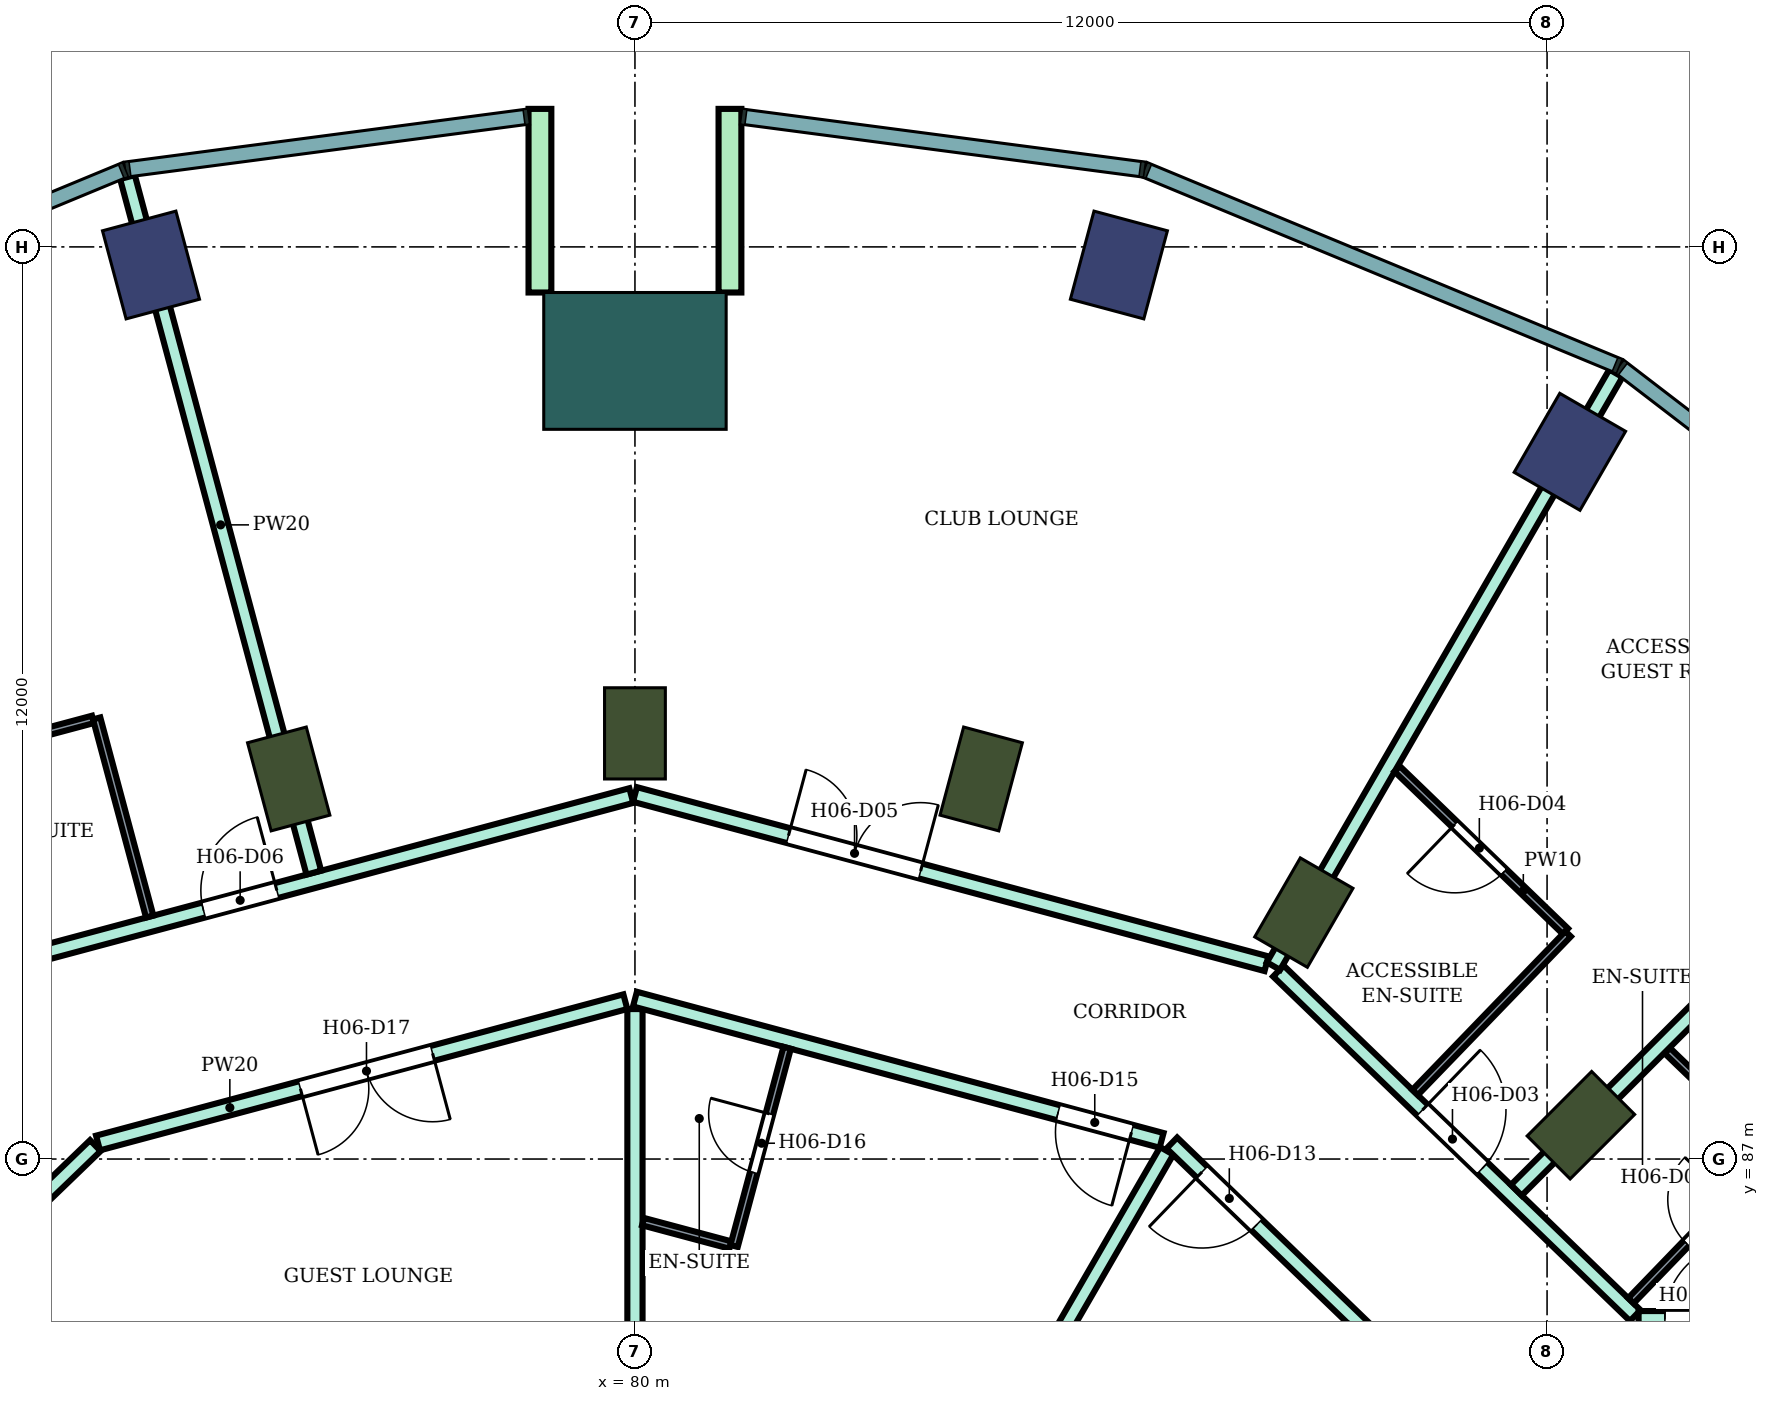
"""IFC4 building model, lengths in metres.
Left out: names, types, materials, properties, quantities, classifications, styles, units other than length and angle.
Written with IfcOpenShell. Run it as: python <this file> out.ifc"""

import sys

from ifc_helpers import new_model, si_unit, direction, frame, frame_2d, origin, origin_2d, place, context, subcontext, project, spatial, rectangle, extrude, element, fill, save


model = new_model("IFC4")
c1 = context("Model", 3, precision=1e-05, world=origin(), true_north=direction((0.0, 1.0)))
c2 = subcontext(c1, "Body", "Model", "MODEL_VIEW")
j1 = project(units=[si_unit("LENGTHUNIT", "METRE"), si_unit("PLANEANGLEUNIT", "RADIAN")], contexts=[c1])
p1 = place(None, origin())
s1 = spatial("IfcSite", under=j1, at=p1, CompositionType="ELEMENT")
p2 = place(p1, origin())
s2 = spatial("IfcBuilding", under=s1, at=p2, CompositionType="ELEMENT")
p3 = place(p2, frame((0.0, 0.0, 93.8)))
s3 = spatial("IfcBuildingStorey", under=s2, at=p3, CompositionType="ELEMENT", Elevation=93.8)
for number, where, z_axis, x_axis in (
    (1, (92.3, 96.304, 0.0), (0.0, 0.0, 1.0), (0.5, 0.866, 0.0)),
    (2, (86.367, 98.762, 0.0), (0.0, 0.0, 1.0), (0.259, 0.966, 0.0)),
    (3, (73.633, 98.762, 0.0), (0.0, 0.0, 1.0), (-0.259, 0.966, 0.0)),
):
    element("IfcColumn", number, at=place(p3, frame(where, z_axis=z_axis, x_axis=x_axis)), inside=s3, PredefinedType="COLUMN", context=c2, shape_type="SweptSolid", body=[
        extrude(rectangle(XDim=1.2, YDim=1.0, at=origin_2d()), origin(), (0.0, 0.0, 1.0), 3.8),
    ])
for number, where, z_axis, x_axis in (
    (4, (92.445, 87.445, 0.0), (0.0, 0.0, 1.0), (0.707, 0.707, 0.0)),
    (5, (88.8, 90.242, 0.0), (0.0, 0.0, 1.0), (0.5, 0.866, 0.0)),
    (6, (84.555, 92.0, 0.0), (0.0, 0.0, 1.0), (0.259, 0.966, 0.0)),
    (7, (80.0, 92.6, 0.0), (0.0, 0.0, 1.0), (0.0, 1.0, 0.0)),
    (8, (75.445, 92.0, 0.0), (0.0, 0.0, 1.0), (-0.259, 0.966, 0.0)),
):
    element("IfcColumn", number, at=place(p3, frame(where, z_axis=z_axis, x_axis=x_axis)), inside=s3, PredefinedType="COLUMN", context=c2, shape_type="SweptSolid", body=[
        extrude(rectangle(XDim=1.2, YDim=0.8, at=origin_2d()), origin(), (0.0, 0.0, 1.0), 3.8),
    ])
p4 = place(p3, frame((80.0, 97.5, 0.0), z_axis=(0.0, 0.0, 1.0), x_axis=(0.0, 1.0, 0.0)))
e9 = element("IfcColumn", 9, at=p4, inside=s3, PredefinedType="COLUMN", context=c2, shape_type="SweptSolid", body=[
    extrude(rectangle(XDim=1.8, YDim=2.4, at=origin_2d()), origin(), (0.0, 0.0, 1.0), 3.8),
])
for number, where, z_axis, x_axis in (
    (10, (81.25, 98.4, 0.0), (0.0, 0.0, 1.0), (0.0, 1.0, 0.0)),
    (11, (78.75, 98.4, 0.0), (0.0, 0.0, 1.0), (0.0, 1.0, 0.0)),
):
    element("IfcWall", number, at=place(p3, frame(where, z_axis=z_axis, x_axis=x_axis)), inside=s3, PredefinedType="NOTDEFINED", context=c2, shape_type="SweptSolid", body=[
        extrude(rectangle(XDim=2.416, YDim=0.3, at=frame_2d((1.208, 0.0))), origin(), (0.0, 0.0, 1.0), 3.8),
    ])
p5 = place(p3, frame((68.987, 83.4, 0.0), z_axis=(0.0, 0.0, 1.0), x_axis=(0.719586298962, 0.694403022997, 0.0)))
e12 = element("IfcWall", 12, at=p5, inside=s3, PredefinedType="PARTITIONING", context=c2, shape_type="SweptSolid", body=[
    extrude(rectangle(XDim=5.439, YDim=0.2, at=frame_2d((2.719, 0.0))), origin(), (0.0, 0.0, 1.0), 3.35),
])
p6 = place(p3, frame((71.614, 89.55, 0.0), z_axis=(0.0, 0.0, 1.0), x_axis=(0.965982378603, 0.258607896685, 0.0)))
e13 = element("IfcWall", 13, at=p6, inside=s3, PredefinedType="PARTITIONING", context=c2, shape_type="SweptSolid", body=[
    extrude(rectangle(XDim=8.632, YDim=0.2, at=frame_2d((4.316, 0.0))), origin(), (0.0, 0.0, 1.0), 3.35),
])
p7 = place(p6, frame((2.804, 0.0, 0.0)))
e14 = element("IfcOpeningElement", 14, at=p7, cuts=e13, PredefinedType="OPENING", context=c2, shape_type="SweptSolid", body=[
    extrude(rectangle(XDim=1.0, YDim=2.1, at=frame_2d((0.5, 1.05))), frame((0.0, 0.11, 0.0), z_axis=(0.0, -1.0, 0.0), x_axis=(1.0, 0.0, 0.0)), (0.0, 0.0, 1.0), 0.22),
])
p8 = place(p3, frame((72.936, 87.211, 0.0), z_axis=(0.0, 0.0, 1.0), x_axis=(0.965917703859, 0.258849356521, 0.0)))
e15 = element("IfcWall", 15, at=p8, inside=s3, PredefinedType="PARTITIONING", context=c2, shape_type="SweptSolid", body=[
    extrude(rectangle(XDim=7.182, YDim=0.2, at=frame_2d((3.591, 0.0))), origin(), (0.0, 0.0, 1.0), 3.35),
])
p9 = place(p8, frame((2.757, 0.0, 0.0)))
e16 = element("IfcOpeningElement", 16, at=p9, cuts=e15, PredefinedType="OPENING", context=c2, shape_type="SweptSolid", body=[
    extrude(rectangle(XDim=1.8, YDim=2.1, at=frame_2d((0.9, 1.05))), frame((0.0, 0.11, 0.0), z_axis=(0.0, -1.0, 0.0), x_axis=(1.0, 0.0, 0.0)), (0.0, 0.0, 1.0), 0.22),
])
p10 = place(p3, frame((73.323, 99.918, 0.0), z_axis=(0.0, 0.0, 1.0), x_axis=(0.258812513968, -0.965927576278, 0.0)))
e17 = element("IfcWall", 17, at=p10, inside=s3, PredefinedType="PARTITIONING", context=c2, shape_type="SweptSolid", body=[
    extrude(rectangle(XDim=9.474, YDim=0.2, at=frame_2d((4.737, 0.0))), origin(), (0.0, 0.0, 1.0), 3.35),
])
p11 = place(p3, frame((80.0, 82.7, 0.0), z_axis=(0.0, 0.0, 1.0), x_axis=(0.0, 1.0, 0.0)))
e18 = element("IfcWall", 18, at=p11, inside=s3, PredefinedType="PARTITIONING", context=c2, shape_type="SweptSolid", body=[
    extrude(rectangle(XDim=6.273, YDim=0.2, at=frame_2d((3.136, 0.0))), origin(), (0.0, 0.0, 1.0), 3.35),
])
p12 = place(p3, frame((80.0, 89.104, 0.0), z_axis=(0.0, 0.0, 1.0), x_axis=(0.965856548257, -0.259077455964, 0.0)))
e19 = element("IfcWall", 19, at=p12, inside=s3, PredefinedType="PARTITIONING", context=c2, shape_type="SweptSolid", body=[
    extrude(rectangle(XDim=7.173, YDim=0.2, at=frame_2d((3.586, 0.0))), origin(), (0.0, 0.0, 1.0), 3.35),
])
p13 = place(p12, frame((5.763, 0.0, 0.0)))
e20 = element("IfcOpeningElement", 20, at=p13, cuts=e19, PredefinedType="OPENING", context=c2, shape_type="SweptSolid", body=[
    extrude(rectangle(XDim=1.0, YDim=2.1, at=frame_2d((0.5, 1.05))), frame((0.0, 0.11, 0.0), z_axis=(0.0, -1.0, 0.0), x_axis=(1.0, 0.0, 0.0)), (0.0, 0.0, 1.0), 0.22),
])
p14 = place(p3, frame((80.0, 91.796, 0.0), z_axis=(0.0, 0.0, 1.0), x_axis=(0.965917643923, -0.258849580177, 0.0)))
e21 = element("IfcWall", 21, at=p14, inside=s3, PredefinedType="PARTITIONING", context=c2, shape_type="SweptSolid", body=[
    extrude(rectangle(XDim=8.602, YDim=0.2, at=frame_2d((4.301, 0.0))), origin(), (0.0, 0.0, 1.0), 3.35),
])
p15 = place(p14, frame((2.091, 0.0, 0.0)))
e22 = element("IfcOpeningElement", 22, at=p15, cuts=e21, PredefinedType="OPENING", context=c2, shape_type="SweptSolid", body=[
    extrude(rectangle(XDim=1.8, YDim=2.1, at=frame_2d((0.9, 1.05))), frame((0.0, 0.11, 0.0), z_axis=(0.0, -1.0, 0.0), x_axis=(1.0, 0.0, 0.0)), (0.0, 0.0, 1.0), 0.22),
])
p16 = place(p3, frame((83.852, 81.665, 0.0), z_axis=(0.0, 0.0, 1.0), x_axis=(0.500236829077, 0.86588862727, 0.0)))
e23 = element("IfcWall", 23, at=p16, inside=s3, PredefinedType="PARTITIONING", context=c2, shape_type="SweptSolid", body=[
    extrude(rectangle(XDim=6.286, YDim=0.2, at=frame_2d((3.143, 0.0))), origin(), (0.0, 0.0, 1.0), 3.35),
])
p17 = place(p3, frame((87.064, 87.211, 0.0), z_axis=(0.0, 0.0, 1.0), x_axis=(0.719540958932, -0.694450004262, 0.0)))
e24 = element("IfcWall", 24, at=p17, inside=s3, PredefinedType="PARTITIONING", context=c2, shape_type="SweptSolid", body=[
    extrude(rectangle(XDim=5.488, YDim=0.2, at=frame_2d((2.744, 0.0))), origin(), (0.0, 0.0, 1.0), 3.35),
])
p18 = place(p17, frame((0.55, 0.0, 0.0)))
e25 = element("IfcOpeningElement", 25, at=p18, cuts=e24, PredefinedType="OPENING", context=c2, shape_type="SweptSolid", body=[
    extrude(rectangle(XDim=1.0, YDim=2.1, at=frame_2d((0.5, 1.05))), frame((0.0, 0.11, 0.0), z_axis=(0.0, -1.0, 0.0), x_axis=(1.0, 0.0, 0.0)), (0.0, 0.0, 1.0), 0.22),
])
p19 = place(p3, frame((88.465, 89.473, 0.0), z_axis=(0.0, 0.0, 1.0), x_axis=(0.719474304909, -0.694519059908, 0.0)))
e26 = element("IfcWall", 26, at=p19, inside=s3, PredefinedType="PARTITIONING", context=c2, shape_type="SweptSolid", body=[
    extrude(rectangle(XDim=6.525, YDim=0.2, at=frame_2d((3.263, 0.0))), origin(), (0.0, 0.0, 1.0), 3.35),
])
p20 = place(p19, frame((2.633, 0.0, 0.0)))
e27 = element("IfcOpeningElement", 27, at=p20, cuts=e26, PredefinedType="OPENING", context=c2, shape_type="SweptSolid", body=[
    extrude(rectangle(XDim=1.1, YDim=2.1, at=frame_2d((0.55, 1.05))), frame((0.0, 0.11, 0.0), z_axis=(0.0, -1.0, 0.0), x_axis=(1.0, 0.0, 0.0)), (0.0, 0.0, 1.0), 0.22),
])
p21 = place(p3, frame((88.4, 89.538, 0.0), z_axis=(0.0, 0.0, 1.0), x_axis=(0.500234695877, 0.865889859648, 0.0)))
e28 = element("IfcWall", 28, at=p21, inside=s3, PredefinedType="PARTITIONING", context=c2, shape_type="SweptSolid", body=[
    extrude(rectangle(XDim=9.007, YDim=0.2, at=frame_2d((4.503, 0.0))), origin(), (0.0, 0.0, 1.0), 3.35),
])
p22 = place(p3, frame((91.595, 86.59, 0.0), z_axis=(0.0, 0.0, 1.0), x_axis=(0.707232337591, 0.706981202484, 0.0)))
e29 = element("IfcWall", 29, at=p22, inside=s3, PredefinedType="PARTITIONING", context=c2, shape_type="SweptSolid", body=[
    extrude(rectangle(XDim=6.805, YDim=0.2, at=frame_2d((3.402, 0.0))), origin(), (0.0, 0.0, 1.0), 3.35),
])
p23 = place(p3, frame((93.204, 84.9, 0.0), z_axis=(0.0, 0.0, 1.0), x_axis=(1.0, 0.0, 0.0)))
e30 = element("IfcWall", 30, at=p23, inside=s3, PredefinedType="PARTITIONING", context=c2, shape_type="SweptSolid", body=[
    extrude(rectangle(XDim=1.496, YDim=0.2, at=frame_2d((0.748, 0.0))), origin(), (0.0, 0.0, 1.0), 3.35),
])
p24 = place(p23, frame((0.346, 0.0, 0.0)))
e31 = element("IfcOpeningElement", 31, at=p24, cuts=e30, PredefinedType="OPENING", context=c2, shape_type="SweptSolid", body=[
    extrude(rectangle(XDim=1.0, YDim=2.1, at=frame_2d((0.5, 1.05))), frame((0.0, 0.11, 0.0), z_axis=(0.0, -1.0, 0.0), x_axis=(1.0, 0.0, 0.0)), (0.0, 0.0, 1.0), 0.22),
])
p25 = place(p3, frame((70.268, 92.087, 0.0), z_axis=(0.0, 0.0, 1.0), x_axis=(0.965937937835, 0.258773839966, 0.0)))
e32 = element("IfcWall", 32, at=p25, inside=s3, PredefinedType="PARTITIONING", context=c2, shape_type="SweptSolid", body=[
    extrude(rectangle(XDim=2.694, YDim=0.1, at=frame_2d((1.347, 0.0))), origin(), (0.0, 0.0, 1.0), 3.35),
])
p26 = place(p25, frame((0.912, 0.0, 0.0)))
e33 = element("IfcOpeningElement", 33, at=p26, cuts=e32, PredefinedType="OPENING", context=c2, shape_type="SweptSolid", body=[
    extrude(rectangle(XDim=0.8, YDim=2.1, at=frame_2d((0.4, 1.05))), frame((0.0, 0.06, 0.0), z_axis=(0.0, -1.0, 0.0), x_axis=(1.0, 0.0, 0.0)), (0.0, 0.0, 1.0), 0.12),
])
p27 = place(p3, frame((72.918, 92.797, 0.0), z_axis=(0.0, 0.0, 1.0), x_axis=(0.25867580527, -0.965964195904, 0.0)))
e34 = element("IfcWall", 34, at=p27, inside=s3, PredefinedType="PARTITIONING", context=c2, shape_type="SweptSolid", body=[
    extrude(rectangle(XDim=2.699, YDim=0.1, at=frame_2d((1.35, 0.0))), origin(), (0.0, 0.0, 1.0), 3.35),
])
p28 = place(p3, frame((80.106, 86.177, 0.0), z_axis=(0.0, 0.0, 1.0), x_axis=(0.966002973184, -0.258530957139, 0.0)))
e35 = element("IfcWall", 35, at=p28, inside=s3, PredefinedType="PARTITIONING", context=c2, shape_type="SweptSolid", body=[
    extrude(rectangle(XDim=1.19, YDim=0.1, at=frame_2d((0.595, 0.0))), origin(), (0.0, 0.0, 1.0), 3.35),
])
p29 = place(p3, frame((81.304, 85.856, 0.0), z_axis=(0.0, 0.0, 1.0), x_axis=(0.25867580527, 0.965964195904, 0.0)))
e36 = element("IfcWall", 36, at=p29, inside=s3, PredefinedType="PARTITIONING", context=c2, shape_type="SweptSolid", body=[
    extrude(rectangle(XDim=2.699, YDim=0.1, at=frame_2d((1.35, 0.0))), origin(), (0.0, 0.0, 1.0), 3.35),
])
p30 = place(p29, frame((1.0, 0.0, 0.0)))
e37 = element("IfcOpeningElement", 37, at=p30, cuts=e36, PredefinedType="OPENING", context=c2, shape_type="SweptSolid", body=[
    extrude(rectangle(XDim=0.8, YDim=2.1, at=frame_2d((0.4, 1.05))), frame((0.0, 0.06, 0.0), z_axis=(0.0, -1.0, 0.0), x_axis=(1.0, 0.0, 0.0)), (0.0, 0.0, 1.0), 0.12),
])
p31 = place(p3, frame((90.027, 92.134, 0.0), z_axis=(0.0, 0.0, 1.0), x_axis=(0.719415132118, -0.694580353652, 0.0)))
e38 = element("IfcWall", 38, at=p31, inside=s3, PredefinedType="PARTITIONING", context=c2, shape_type="SweptSolid", body=[
    extrude(rectangle(XDim=3.077, YDim=0.1, at=frame_2d((1.539, 0.0))), origin(), (0.0, 0.0, 1.0), 3.35),
])
p32 = place(p31, frame((1.053, 0.0, 0.0)))
e39 = element("IfcOpeningElement", 39, at=p32, cuts=e38, PredefinedType="OPENING", context=c2, shape_type="SweptSolid", body=[
    extrude(rectangle(XDim=0.9, YDim=2.1, at=frame_2d((0.45, 1.05))), frame((0.0, 0.06, 0.0), z_axis=(0.0, -1.0, 0.0), x_axis=(1.0, 0.0, 0.0)), (0.0, 0.0, 1.0), 0.12),
])
p33 = place(p3, frame((90.263, 87.876, 0.0), z_axis=(0.0, 0.0, 1.0), x_axis=(0.694534400859, 0.719459495749, 0.0)))
e40 = element("IfcWall", 40, at=p33, inside=s3, PredefinedType="PARTITIONING", context=c2, shape_type="SweptSolid", body=[
    extrude(rectangle(XDim=2.899, YDim=0.1, at=frame_2d((1.45, 0.0))), origin(), (0.0, 0.0, 1.0), 3.35),
])
p34 = place(p3, frame((93.104, 85.136, 0.0), z_axis=(0.0, 0.0, 1.0), x_axis=(0.694324808789, 0.719661767708, 0.0)))
e41 = element("IfcWall", 41, at=p34, inside=s3, PredefinedType="PARTITIONING", context=c2, shape_type="SweptSolid", body=[
    extrude(rectangle(XDim=2.65, YDim=0.1, at=frame_2d((1.325, 0.0))), origin(), (0.0, 0.0, 1.0), 3.35),
])
p35 = place(p34, frame((1.05, 0.0, 0.0)))
e42 = element("IfcOpeningElement", 42, at=p35, cuts=e41, PredefinedType="OPENING", context=c2, shape_type="SweptSolid", body=[
    extrude(rectangle(XDim=0.8, YDim=2.1, at=frame_2d((0.4, 1.05))), frame((0.0, 0.06, 0.0), z_axis=(0.0, -1.0, 0.0), x_axis=(1.0, 0.0, 0.0)), (0.0, 0.0, 1.0), 0.12),
])
p36 = place(p3, frame((93.582, 88.426, 0.0), z_axis=(0.0, 0.0, 1.0), x_axis=(0.719707242969, -0.694277670977, 0.0)))
e43 = element("IfcWall", 43, at=p36, inside=s3, PredefinedType="PARTITIONING", context=c2, shape_type="SweptSolid", body=[
    extrude(rectangle(XDim=1.939, YDim=0.1, at=frame_2d((0.97, 0.0))), origin(), (0.0, 0.0, 1.0), 3.35),
])
p37 = place(p24, origin())
e44 = element("IfcDoor", 44, at=p37, inside=s3, OperationType="SINGLE_SWING_RIGHT", PredefinedType="DOOR", context=c2, shape_type="SweptSolid", body=[
    extrude(rectangle(XDim=1.0, YDim=2.1, at=frame_2d((0.5, 1.05))), frame((0.0, 0.025, 0.0), z_axis=(0.0, -1.0, 0.0), x_axis=(1.0, 0.0, 0.0)), (0.0, 0.0, 1.0), 0.05),
])
fill(e31, e44)
p38 = place(p35, origin())
e45 = element("IfcDoor", 45, at=p38, inside=s3, OperationType="SINGLE_SWING_RIGHT", PredefinedType="DOOR", context=c2, shape_type="SweptSolid", body=[
    extrude(rectangle(XDim=0.8, YDim=2.1, at=frame_2d((0.4, 1.05))), frame((0.0, 0.025, 0.0), z_axis=(0.0, -1.0, 0.0), x_axis=(1.0, 0.0, 0.0)), (0.0, 0.0, 1.0), 0.05),
])
fill(e42, e45)
p39 = place(p20, origin())
e46 = element("IfcDoor", 46, at=p39, inside=s3, OperationType="SINGLE_SWING_LEFT", PredefinedType="DOOR", context=c2, shape_type="SweptSolid", body=[
    extrude(rectangle(XDim=1.1, YDim=2.1, at=frame_2d((0.55, 1.05))), frame((0.0, 0.025, 0.0), z_axis=(0.0, -1.0, 0.0), x_axis=(1.0, 0.0, 0.0)), (0.0, 0.0, 1.0), 0.05),
])
fill(e27, e46)
p40 = place(p32, frame((0.9, 0.0, 0.0), z_axis=(0.0, 0.0, 1.0), x_axis=(-1.0, 0.0, 0.0)))
e47 = element("IfcDoor", 47, at=p40, inside=s3, OperationType="SINGLE_SWING_RIGHT", PredefinedType="DOOR", context=c2, shape_type="SweptSolid", body=[
    extrude(rectangle(XDim=0.9, YDim=2.1, at=frame_2d((0.45, 1.05))), frame((0.0, 0.025, 0.0), z_axis=(0.0, -1.0, 0.0), x_axis=(1.0, 0.0, 0.0)), (0.0, 0.0, 1.0), 0.05),
])
fill(e39, e47)
p41 = place(p15, origin())
e48 = element("IfcDoor", 48, at=p41, inside=s3, OperationType="DOUBLE_DOOR_SINGLE_SWING", PredefinedType="DOOR", context=c2, shape_type="SweptSolid", body=[
    extrude(rectangle(XDim=1.8, YDim=2.1, at=frame_2d((0.9, 1.05))), frame((0.0, 0.025, 0.0), z_axis=(0.0, -1.0, 0.0), x_axis=(1.0, 0.0, 0.0)), (0.0, 0.0, 1.0), 0.05),
])
fill(e22, e48)
p42 = place(p7, origin())
e49 = element("IfcDoor", 49, at=p42, inside=s3, OperationType="SINGLE_SWING_RIGHT", PredefinedType="DOOR", context=c2, shape_type="SweptSolid", body=[
    extrude(rectangle(XDim=1.0, YDim=2.1, at=frame_2d((0.5, 1.05))), frame((0.0, 0.025, 0.0), z_axis=(0.0, -1.0, 0.0), x_axis=(1.0, 0.0, 0.0)), (0.0, 0.0, 1.0), 0.05),
])
fill(e14, e49)
p43 = place(p18, frame((1.0, 0.0, 0.0), z_axis=(0.0, 0.0, 1.0), x_axis=(-1.0, 0.0, 0.0)))
e50 = element("IfcDoor", 50, at=p43, inside=s3, OperationType="SINGLE_SWING_RIGHT", PredefinedType="DOOR", context=c2, shape_type="SweptSolid", body=[
    extrude(rectangle(XDim=1.0, YDim=2.1, at=frame_2d((0.5, 1.05))), frame((0.0, 0.025, 0.0), z_axis=(0.0, -1.0, 0.0), x_axis=(1.0, 0.0, 0.0)), (0.0, 0.0, 1.0), 0.05),
])
fill(e25, e50)
p44 = place(p13, frame((1.0, 0.0, 0.0), z_axis=(0.0, 0.0, 1.0), x_axis=(-1.0, 0.0, 0.0)))
e51 = element("IfcDoor", 51, at=p44, inside=s3, OperationType="SINGLE_SWING_LEFT", PredefinedType="DOOR", context=c2, shape_type="SweptSolid", body=[
    extrude(rectangle(XDim=1.0, YDim=2.1, at=frame_2d((0.5, 1.05))), frame((0.0, 0.025, 0.0), z_axis=(0.0, -1.0, 0.0), x_axis=(1.0, 0.0, 0.0)), (0.0, 0.0, 1.0), 0.05),
])
fill(e20, e51)
p45 = place(p30, origin())
e52 = element("IfcDoor", 52, at=p45, inside=s3, OperationType="SINGLE_SWING_RIGHT", PredefinedType="DOOR", context=c2, shape_type="SweptSolid", body=[
    extrude(rectangle(XDim=0.8, YDim=2.1, at=frame_2d((0.4, 1.05))), frame((0.0, 0.025, 0.0), z_axis=(0.0, -1.0, 0.0), x_axis=(1.0, 0.0, 0.0)), (0.0, 0.0, 1.0), 0.05),
])
fill(e37, e52)
p46 = place(p9, frame((1.8, 0.0, 0.0), z_axis=(0.0, 0.0, 1.0), x_axis=(-1.0, 0.0, 0.0)))
e53 = element("IfcDoor", 53, at=p46, inside=s3, OperationType="DOUBLE_DOOR_SINGLE_SWING", PredefinedType="DOOR", context=c2, shape_type="SweptSolid", body=[
    extrude(rectangle(XDim=1.8, YDim=2.1, at=frame_2d((0.9, 1.05))), frame((0.0, 0.025, 0.0), z_axis=(0.0, -1.0, 0.0), x_axis=(1.0, 0.0, 0.0)), (0.0, 0.0, 1.0), 0.05),
])
fill(e16, e53)
save(model, sys.argv[1])
